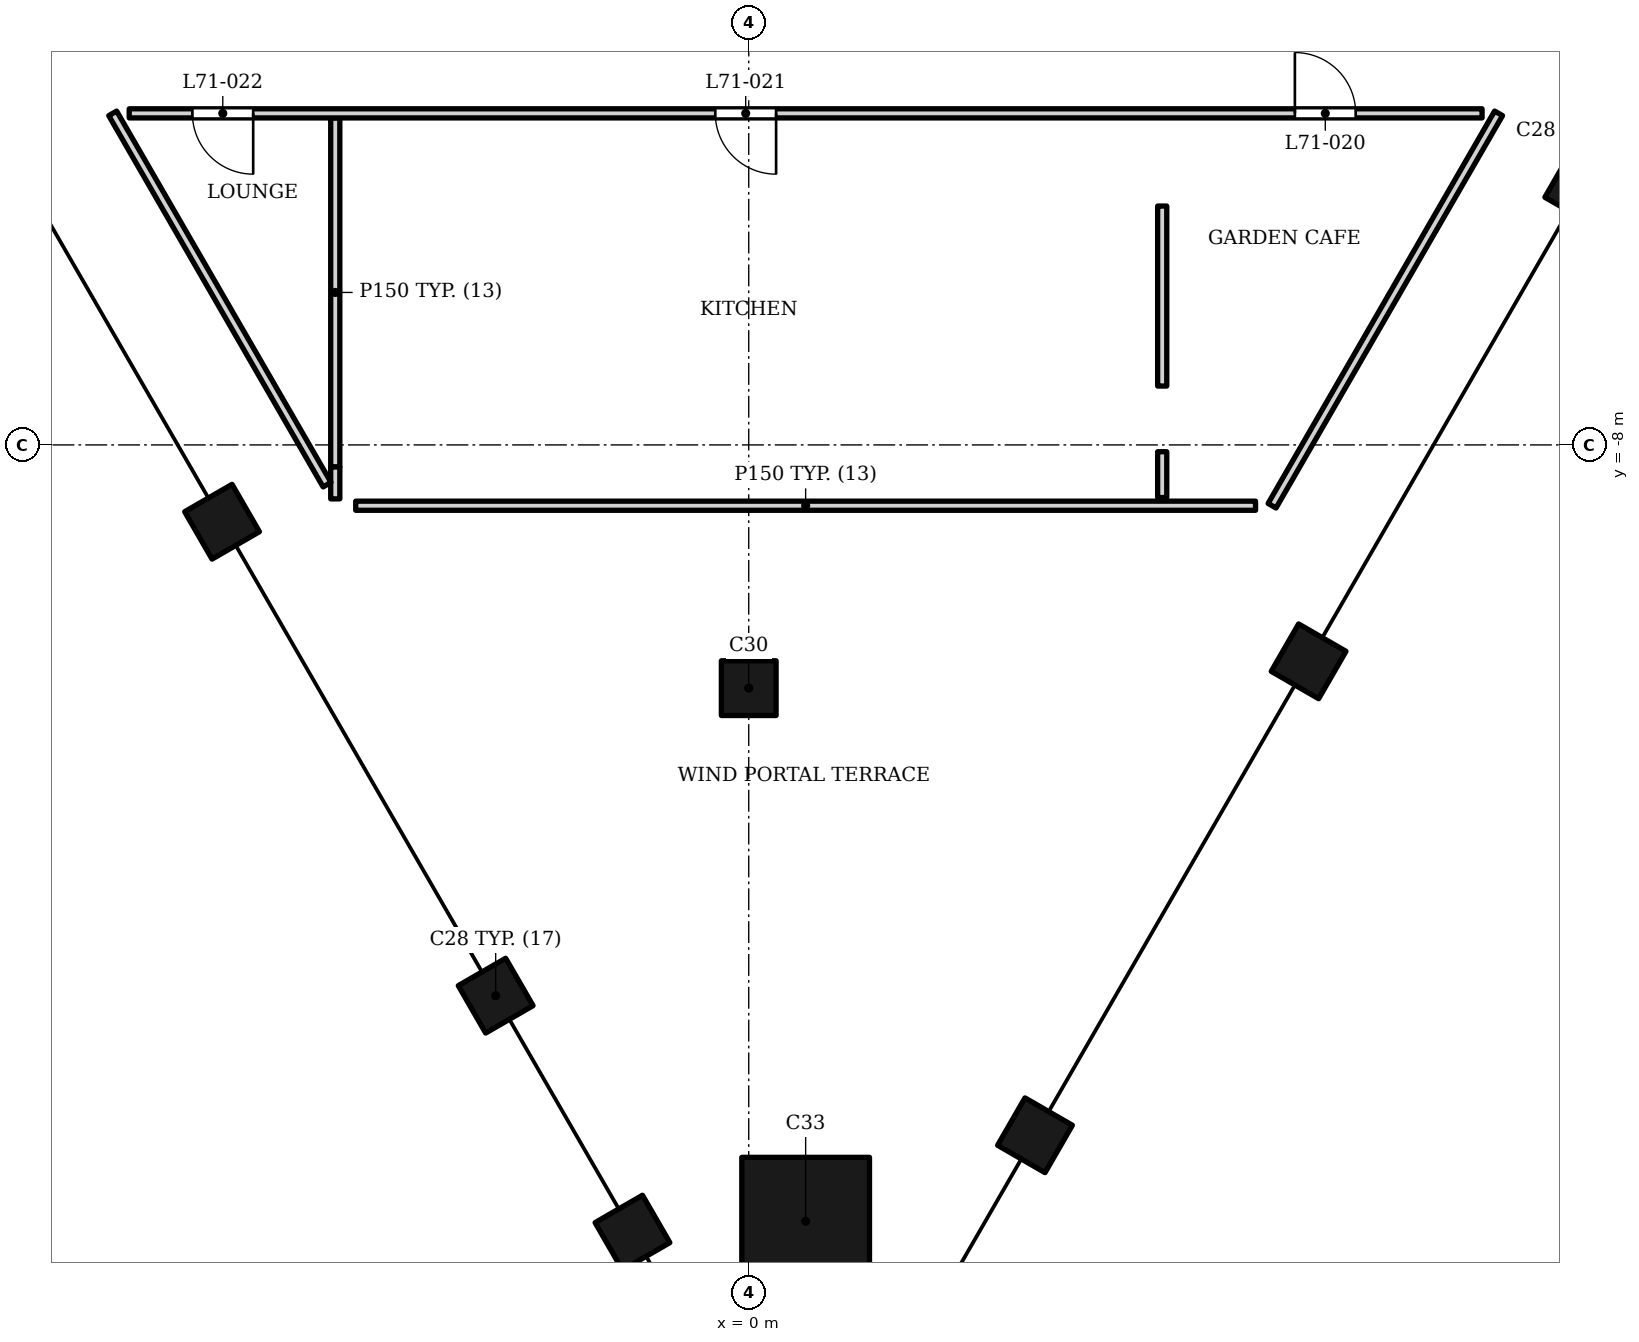
"""IFC4 building model, lengths in metres.
Left out: names, types, materials, properties, quantities, classifications, styles, units other than length and angle.
Written with IfcOpenShell. Run it as: python <this file> out.ifc"""

import sys

from ifc_helpers import new_model, si_unit, direction, frame, frame_2d, origin, origin_2d, place, context, subcontext, project, spatial, polyline, rectangle, outline, extrude, element, fill, save


model = new_model("IFC4")
c1 = context("Model", 3, precision=1e-05, world=origin(), true_north=direction((0.0, 1.0)))
c2 = subcontext(c1, "Body", "Model", "MODEL_VIEW")
j1 = project(units=[si_unit("LENGTHUNIT", "METRE"), si_unit("PLANEANGLEUNIT", "RADIAN")], contexts=[c1])
p1 = place(None, origin())
s1 = spatial("IfcSite", under=j1, at=p1, CompositionType="ELEMENT")
p2 = place(p1, origin())
s2 = spatial("IfcBuilding", under=s1, at=p2, CompositionType="ELEMENT")
p3 = place(p2, frame((0.0, 0.0, 295.0)))
s3 = spatial("IfcBuildingStorey", under=s2, at=p3, CompositionType="ELEMENT", Elevation=295.0)
p4 = place(p3, frame((0.936, -20.766, 0.0), z_axis=(0.0, 0.0, 1.0), x_axis=(0.0, 1.0, 0.0)))
e1 = element("IfcColumn", 1, at=p4, inside=s3, PredefinedType="COLUMN", context=c2, shape_type="SweptSolid", body=[
    extrude(rectangle(XDim=2.1, YDim=2.1, at=origin_2d()), origin(), (0.0, 0.0, 1.0), 7.5),
])
for number, where, z_axis, x_axis in (
    (2, (0.0, -12.0, 0.0), (0.0, 0.0, 1.0), (1.0, 0.0, 0.0)),
    (3, (-8.662, -9.263, 0.0), (0.0, 0.0, 1.0), (0.5, -0.866, 0.0)),
    (4, (-4.162, -17.057, 0.0), (0.0, 0.0, 1.0), (0.5, -0.866, 0.0)),
    (5, (-1.912, -20.954, 0.0), (0.0, 0.0, 1.0), (0.5, -0.866, 0.0)),
    (6, (4.708, -19.353, 0.0), (0.0, 0.0, 1.0), (0.5, 0.866, 0.0)),
    (7, (9.208, -11.559, 0.0), (0.0, 0.0, 1.0), (0.5, 0.866, 0.0)),
    (8, (13.708, -3.763, 0.0), (0.0, 0.0, 1.0), (0.5, 0.866, 0.0)),
):
    element("IfcColumn", number, at=place(p3, frame(where, z_axis=z_axis, x_axis=x_axis)), inside=s3, PredefinedType="COLUMN", context=c2, shape_type="SweptSolid", body=[
        extrude(rectangle(XDim=0.9, YDim=0.9, at=origin_2d()), origin(), (0.0, 0.0, 1.0), 7.5),
    ])
p5 = place(p3, origin())
e9 = element("IfcWall", 9, at=p5, inside=s3, PredefinedType="USERDEFINED", context=c2, shape_type="SweptSolid", body=[
    extrude(outline(polyline([(0.397, -8.052), (0.397, -7.052), (-3.603, -7.052), (-3.603, -8.052), (0.397, -8.052)])), origin(), (0.0, 0.0, 1.0), 0.8),
])
p6 = place(p3, origin())
e10 = element("IfcWall", 10, at=p6, inside=s3, PredefinedType="USERDEFINED", context=c2, shape_type="SweptSolid", body=[
    extrude(outline(polyline([(7.397, -8.052), (7.397, -7.052), (3.397, -7.052), (3.397, -8.052), (7.397, -8.052)])), origin(), (0.0, 0.0, 1.0), 0.8),
])
p7 = place(p3, origin())
e11 = element("IfcWall", 11, at=p7, inside=s3, PredefinedType="USERDEFINED", context=c2, shape_type="SweptSolid", body=[
    extrude(outline(polyline([(0.397, -4.052), (0.397, -3.052), (-3.603, -3.052), (-3.603, -4.052), (0.397, -4.052)])), origin(), (0.0, 0.0, 1.0), 0.8),
])
p8 = place(p3, origin())
e12 = element("IfcWall", 12, at=p8, inside=s3, PredefinedType="USERDEFINED", context=c2, shape_type="SweptSolid", body=[
    extrude(outline(polyline([(7.397, -4.052), (7.397, -3.052), (3.397, -3.052), (3.397, -4.052), (7.397, -4.052)])), origin(), (0.0, 0.0, 1.0), 0.8),
])
p9 = place(p3, frame((-6.464, -9.0, 0.0), z_axis=(0.0, 0.0, 1.0), x_axis=(1.0, 0.0, 0.0)))
e13 = element("IfcWall", 13, at=p9, inside=s3, PredefinedType="PARTITIONING", context=c2, shape_type="SweptSolid", body=[
    extrude(rectangle(XDim=14.799, YDim=0.15, at=frame_2d((7.399, 0.0))), origin(), (0.0, 0.0, 1.0), 6.212),
])
p10 = place(p3, frame((6.8, -7.032, 0.0), z_axis=(0.0, 0.0, 1.0), x_axis=(0.0, 1.0, 0.0)))
e14 = element("IfcWall", 14, at=p10, inside=s3, PredefinedType="PARTITIONING", context=c2, shape_type="SweptSolid", body=[
    extrude(rectangle(XDim=2.96, YDim=0.15, at=frame_2d((1.48, 0.0))), origin(), (0.0, 0.0, 1.0), 7.2),
])
p11 = place(p3, frame((-6.8, -8.363, 0.0), z_axis=(0.0, 0.0, 1.0), x_axis=(0.0, 1.0, 0.0)))
e15 = element("IfcWall", 15, at=p11, inside=s3, PredefinedType="PARTITIONING", context=c2, shape_type="SweptSolid", body=[
    extrude(rectangle(XDim=5.74, YDim=0.15, at=frame_2d((2.87, 0.0))), origin(), (0.0, 0.0, 1.0), 7.2),
])
p12 = place(p3, frame((-10.189, -2.547, 0.0), z_axis=(0.0, 0.0, 1.0), x_axis=(1.0, 0.0, 0.0)))
e16 = element("IfcWall", 16, at=p12, inside=s3, PredefinedType="PARTITIONING", context=c2, shape_type="SweptSolid", body=[
    extrude(rectangle(XDim=22.25, YDim=0.15, at=frame_2d((11.125, 0.0))), origin(), (0.0, 0.0, 1.0), 6.212),
])
p13 = place(p12, frame((19.171, 0.0, 0.0)))
e17 = element("IfcOpeningElement", 17, at=p13, cuts=e16, PredefinedType="OPENING", context=c2, shape_type="SweptSolid", body=[
    extrude(rectangle(XDim=1.0, YDim=2.1, at=frame_2d((0.5, 1.05))), frame((0.0, 0.085, 0.0), z_axis=(0.0, -1.0, 0.0), x_axis=(1.0, 0.0, 0.0)), (0.0, 0.0, 1.0), 0.17),
])
p14 = place(p12, frame((9.639, 0.0, 0.0)))
e18 = element("IfcOpeningElement", 18, at=p14, cuts=e16, PredefinedType="OPENING", context=c2, shape_type="SweptSolid", body=[
    extrude(rectangle(XDim=1.0, YDim=2.1, at=frame_2d((0.5, 1.05))), frame((0.0, 0.085, 0.0), z_axis=(0.0, -1.0, 0.0), x_axis=(1.0, 0.0, 0.0)), (0.0, 0.0, 1.0), 0.17),
])
p15 = place(p12, frame((1.039, 0.0, 0.0)))
e19 = element("IfcOpeningElement", 19, at=p15, cuts=e16, PredefinedType="OPENING", context=c2, shape_type="SweptSolid", body=[
    extrude(rectangle(XDim=1.0, YDim=2.1, at=frame_2d((0.5, 1.05))), frame((0.0, 0.085, 0.0), z_axis=(0.0, -1.0, 0.0), x_axis=(1.0, 0.0, 0.0)), (0.0, 0.0, 1.0), 0.17),
])
p16 = place(p3, frame((8.607, -9.0, 0.0), z_axis=(0.0, 0.0, 1.0), x_axis=(0.499990965763, 0.866030619641, 0.0)))
e20 = element("IfcWall", 20, at=p16, inside=s3, PredefinedType="PARTITIONING", context=c2, shape_type="SweptSolid", body=[
    extrude(rectangle(XDim=7.451, YDim=0.15, at=frame_2d((3.726, 0.0))), origin(), (0.0, 0.0, 1.0), 6.444),
])
p17 = place(p3, frame((6.8, -8.112, 0.0), z_axis=(0.0, 0.0, 1.0), x_axis=(0.0, -1.0, 0.0)))
e21 = element("IfcWall", 21, at=p17, inside=s3, PredefinedType="PARTITIONING", context=c2, shape_type="SweptSolid", body=[
    extrude(rectangle(XDim=0.753, YDim=0.15, at=frame_2d((0.376, 0.0))), origin(), (0.0, 0.0, 1.0), 7.2),
])
p18 = place(p3, frame((-6.8, -8.363, 0.0), z_axis=(0.0, 0.0, 1.0), x_axis=(0.0, -1.0, 0.0)))
e22 = element("IfcWall", 22, at=p18, inside=s3, PredefinedType="PARTITIONING", context=c2, shape_type="SweptSolid", body=[
    extrude(rectangle(XDim=0.525, YDim=0.15, at=frame_2d((0.262, 0.0))), origin(), (0.0, 0.0, 1.0), 7.2),
])
p19 = place(p3, frame((-10.46, -2.547, 0.0), z_axis=(0.0, 0.0, 1.0), x_axis=(0.499982213141, -0.866035672789, 0.0)))
e23 = element("IfcWall", 23, at=p19, inside=s3, PredefinedType="PARTITIONING", context=c2, shape_type="SweptSolid", body=[
    extrude(rectangle(XDim=7.051, YDim=0.15, at=frame_2d((3.525, 0.0))), origin(), (0.0, 0.0, 1.0), 6.5),
])
p20 = place(p13, origin())
e24 = element("IfcDoor", 24, at=p20, inside=s3, OperationType="SINGLE_SWING_LEFT", PredefinedType="DOOR", context=c2, shape_type="SweptSolid", body=[
    extrude(rectangle(XDim=1.0, YDim=2.1, at=frame_2d((0.5, 1.05))), frame((0.0, 0.025, 0.0), z_axis=(0.0, -1.0, 0.0), x_axis=(1.0, 0.0, 0.0)), (0.0, 0.0, 1.0), 0.05),
])
fill(e17, e24)
p21 = place(p14, origin())
e25 = element("IfcDoor", 25, at=p21, inside=s3, OperationType="SINGLE_SWING_RIGHT", PredefinedType="DOOR", context=c2, shape_type="SweptSolid", body=[
    extrude(rectangle(XDim=1.0, YDim=2.1, at=frame_2d((0.5, 1.05))), frame((0.0, 0.025, 0.0), z_axis=(0.0, -1.0, 0.0), x_axis=(1.0, 0.0, 0.0)), (0.0, 0.0, 1.0), 0.05),
])
fill(e18, e25)
p22 = place(p15, origin())
e26 = element("IfcDoor", 26, at=p22, inside=s3, OperationType="SINGLE_SWING_RIGHT", PredefinedType="DOOR", context=c2, shape_type="SweptSolid", body=[
    extrude(rectangle(XDim=1.0, YDim=2.1, at=frame_2d((0.5, 1.05))), frame((0.0, 0.025, 0.0), z_axis=(0.0, -1.0, 0.0), x_axis=(1.0, 0.0, 0.0)), (0.0, 0.0, 1.0), 0.05),
])
fill(e19, e26)
save(model, sys.argv[1])
